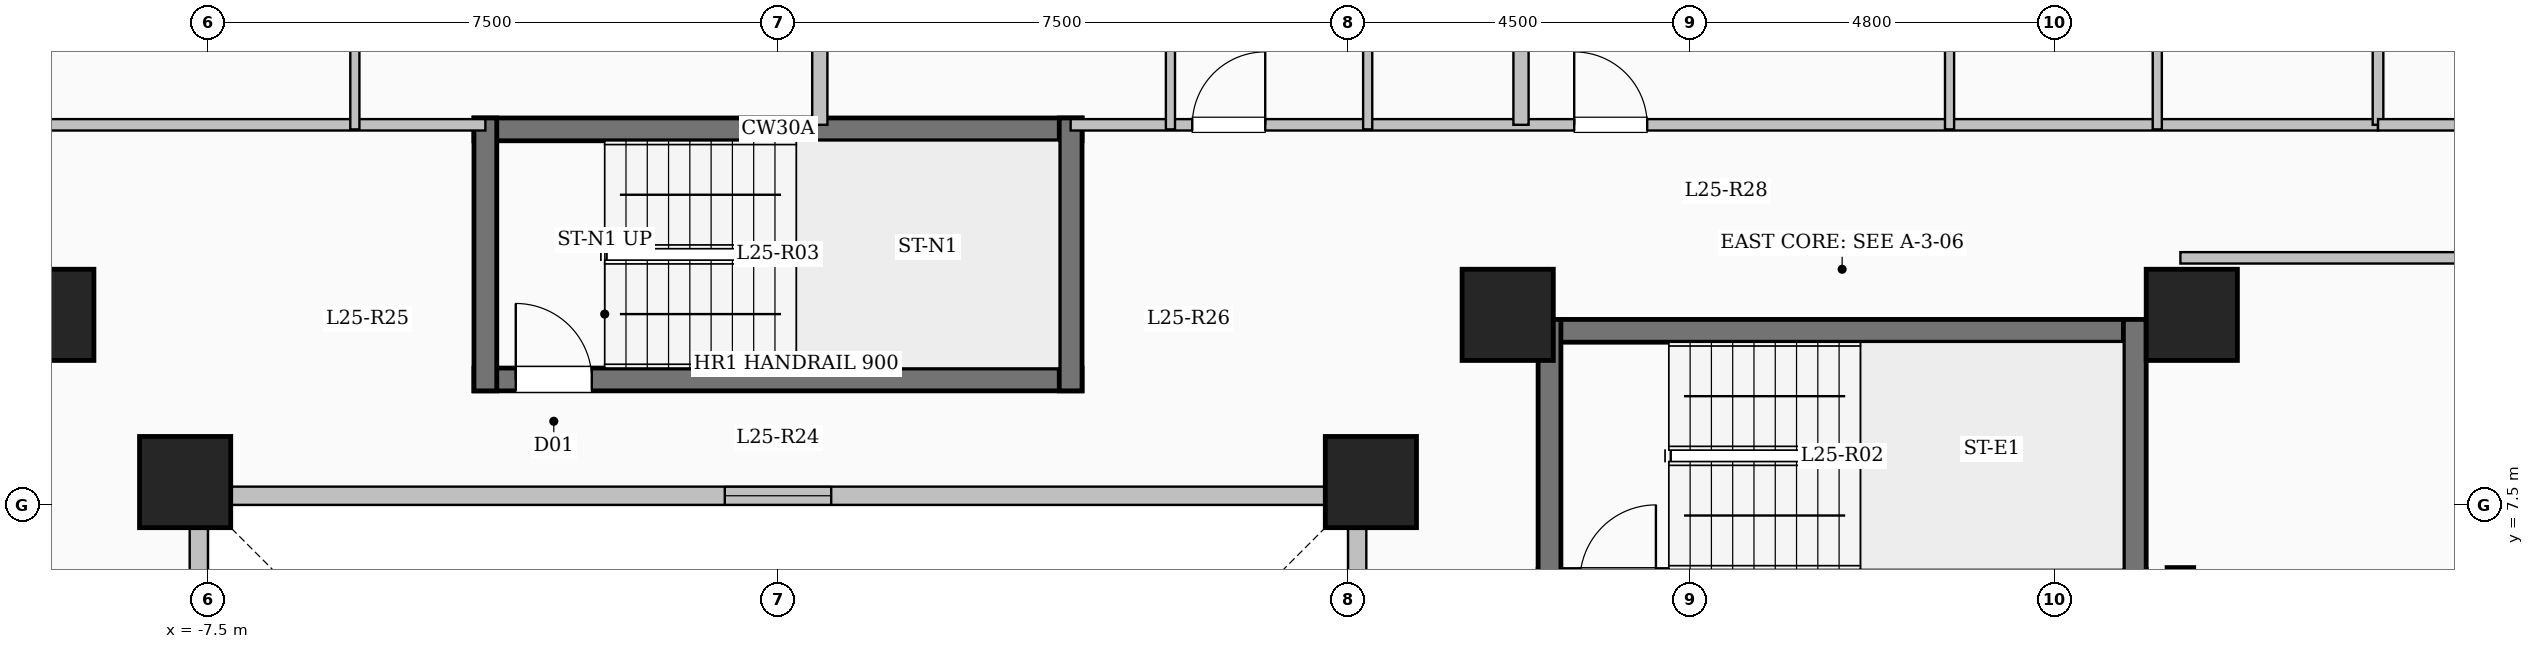
"""IFC4 building model, lengths in metres.
Left out: names, types, materials, properties, quantities, classifications, styles, units other than length and angle.
Written with IfcOpenShell. Run it as: python <this file> out.ifc"""

import sys

from ifc_helpers import new_model, si_unit, direction, frame, frame_2d, origin, origin_2d, place, context, subcontext, project, spatial, rectangle, extrude, element, fill, save


model = new_model("IFC4")
c1 = context("Model", 3, precision=1e-05, world=origin(), true_north=direction((0.0, 1.0)))
c2 = subcontext(c1, "Body", "Model", "MODEL_VIEW")
j1 = project(units=[si_unit("LENGTHUNIT", "METRE"), si_unit("PLANEANGLEUNIT", "RADIAN")], contexts=[c1])
p1 = place(None, origin())
s1 = spatial("IfcSite", under=j1, at=p1, CompositionType="ELEMENT")
p2 = place(p1, origin())
s2 = spatial("IfcBuilding", under=s1, at=p2, CompositionType="ELEMENT")
p3 = place(p2, frame((0.0, 0.0, 95.05)))
s3 = spatial("IfcBuildingStorey", under=s2, at=p3, CompositionType="ELEMENT", Elevation=95.05)
for number, where, z_axis, x_axis in (
    (1, (-7.8, 7.8, 0.0), (0.0, 0.0, 1.0), (1.0, 0.0, 0.0)),
    (2, (7.8, 7.8, 0.0), (0.0, 0.0, 1.0), (1.0, 0.0, 0.0)),
    (3, (-9.6, 10.0, 0.0), (0.0, 0.0, 1.0), (1.0, 0.0, 0.0)),
    (4, (9.6, 10.0, 0.0), (0.0, 0.0, 1.0), (1.0, 0.0, 0.0)),
    (5, (18.6, 10.0, 0.0), (0.0, 0.0, 1.0), (1.0, 0.0, 0.0)),
):
    element("IfcColumn", number, at=place(p3, frame(where, z_axis=z_axis, x_axis=x_axis)), inside=s3, PredefinedType="COLUMN", context=c2, shape_type="SweptSolid", body=[
        extrude(rectangle(XDim=1.2, YDim=1.2, at=origin_2d()), origin(), (0.0, 0.0, 1.0), 3.35),
    ])
p4 = place(p3, frame((7.62, -7.62, 0.0), z_axis=(0.0, 0.0, 1.0), x_axis=(0.0, 1.0, 0.0)))
e6 = element("IfcWall", 6, at=p4, inside=s3, PredefinedType="SOLIDWALL", context=c2, shape_type="SweptSolid", body=[
    extrude(rectangle(XDim=15.24, YDim=0.24, at=frame_2d((7.62, 0.0))), origin(), (0.0, 0.0, 1.0), 3.1),
])
p5 = place(p4, frame((6.92, 0.0, 0.95)))
e7 = element("IfcOpeningElement", 7, at=p5, cuts=e6, PredefinedType="OPENING", context=c2, shape_type="SweptSolid", body=[
    extrude(rectangle(XDim=1.4, YDim=1.5, at=frame_2d((0.7, 0.75))), frame((0.0, 0.13, 0.0), z_axis=(0.0, -1.0, 0.0), x_axis=(1.0, 0.0, 0.0)), (0.0, 0.0, 1.0), 0.26),
])
p6 = place(p3, frame((7.62, 7.62, 0.0), z_axis=(0.0, 0.0, 1.0), x_axis=(-1.0, 0.0, 0.0)))
e8 = element("IfcWall", 8, at=p6, inside=s3, PredefinedType="SOLIDWALL", context=c2, shape_type="SweptSolid", body=[
    extrude(rectangle(XDim=15.24, YDim=0.24, at=frame_2d((7.62, 0.0))), origin(), (0.0, 0.0, 1.0), 3.1),
])
p7 = place(p6, frame((6.92, 0.0, 0.95)))
e9 = element("IfcOpeningElement", 9, at=p7, cuts=e8, PredefinedType="OPENING", context=c2, shape_type="SweptSolid", body=[
    extrude(rectangle(XDim=1.4, YDim=1.5, at=frame_2d((0.7, 0.75))), frame((0.0, 0.13, 0.0), z_axis=(0.0, -1.0, 0.0), x_axis=(1.0, 0.0, 0.0)), (0.0, 0.0, 1.0), 0.26),
])
p8 = place(p3, frame((-7.62, 7.62, 0.0), z_axis=(0.0, 0.0, 1.0), x_axis=(0.0, -1.0, 0.0)))
e10 = element("IfcWall", 10, at=p8, inside=s3, PredefinedType="SOLIDWALL", context=c2, shape_type="SweptSolid", body=[
    extrude(rectangle(XDim=15.24, YDim=0.24, at=frame_2d((7.62, 0.0))), origin(), (0.0, 0.0, 1.0), 3.1),
])
p9 = place(p8, frame((6.92, 0.0, 0.95)))
e11 = element("IfcOpeningElement", 11, at=p9, cuts=e10, PredefinedType="OPENING", context=c2, shape_type="SweptSolid", body=[
    extrude(rectangle(XDim=1.4, YDim=1.5, at=frame_2d((0.7, 0.75))), frame((0.0, 0.13, 0.0), z_axis=(0.0, -1.0, 0.0), x_axis=(1.0, 0.0, 0.0)), (0.0, 0.0, 1.0), 0.26),
])
p10 = place(p3, frame((10.0, 9.79, 0.0), z_axis=(0.0, 0.0, 1.0), x_axis=(1.0, 0.0, 0.0)))
e12 = element("IfcWall", 12, at=p10, inside=s3, PredefinedType="SHEAR", context=c2, shape_type="SweptSolid", body=[
    extrude(rectangle(XDim=8.0, YDim=0.3, at=frame_2d((4.0, 0.0))), origin(), (0.0, 0.0, 1.0), 3.35),
])
p11 = place(p3, frame((10.0, 6.5, 0.0), z_axis=(0.0, 0.0, 1.0), x_axis=(1.0, 0.0, 0.0)))
e13 = element("IfcWall", 13, at=p11, inside=s3, PredefinedType="SHEAR", context=c2, shape_type="SweptSolid", body=[
    extrude(rectangle(XDim=8.0, YDim=0.3, at=frame_2d((4.0, 0.0))), origin(), (0.0, 0.0, 1.0), 3.35),
])
p12 = place(p11, frame((0.55, 0.0, 0.0)))
e14 = element("IfcOpeningElement", 14, at=p12, cuts=e13, PredefinedType="OPENING", context=c2, shape_type="SweptSolid", body=[
    extrude(rectangle(XDim=1.0, YDim=2.15, at=frame_2d((0.5, 1.075))), frame((0.0, 0.16, 0.0), z_axis=(0.0, -1.0, 0.0), x_axis=(1.0, 0.0, 0.0)), (0.0, 0.0, 1.0), 0.32),
])
for number, where, z_axis, x_axis in (
    (15, (10.15, 6.35, 0.0), (0.0, 0.0, 1.0), (0.0, 1.0, 0.0)),
    (16, (17.85, 6.35, 0.0), (0.0, 0.0, 1.0), (0.0, 1.0, 0.0)),
):
    element("IfcWall", number, at=place(p3, frame(where, z_axis=z_axis, x_axis=x_axis)), inside=s3, PredefinedType="SHEAR", context=c2, shape_type="SweptSolid", body=[
        extrude(rectangle(XDim=3.59, YDim=0.3, at=frame_2d((1.795, 0.0))), origin(), (0.0, 0.0, 1.0), 3.35),
    ])
p13 = place(p3, frame((-4.0, 12.44, 0.0), z_axis=(0.0, 0.0, 1.0), x_axis=(1.0, 0.0, 0.0)))
e17 = element("IfcWall", 17, at=p13, inside=s3, PredefinedType="SHEAR", context=c2, shape_type="SweptSolid", body=[
    extrude(rectangle(XDim=8.0, YDim=0.3, at=frame_2d((4.0, 0.0))), origin(), (0.0, 0.0, 1.0), 3.35),
])
p14 = place(p3, frame((-4.0, 9.15, 0.0), z_axis=(0.0, 0.0, 1.0), x_axis=(1.0, 0.0, 0.0)))
e18 = element("IfcWall", 18, at=p14, inside=s3, PredefinedType="SHEAR", context=c2, shape_type="SweptSolid", body=[
    extrude(rectangle(XDim=8.0, YDim=0.3, at=frame_2d((4.0, 0.0))), origin(), (0.0, 0.0, 1.0), 3.35),
])
p15 = place(p14, frame((0.55, 0.0, 0.0)))
e19 = element("IfcOpeningElement", 19, at=p15, cuts=e18, PredefinedType="OPENING", context=c2, shape_type="SweptSolid", body=[
    extrude(rectangle(XDim=1.0, YDim=2.15, at=frame_2d((0.5, 1.075))), frame((0.0, 0.16, 0.0), z_axis=(0.0, -1.0, 0.0), x_axis=(1.0, 0.0, 0.0)), (0.0, 0.0, 1.0), 0.32),
])
for number, where, z_axis, x_axis in (
    (20, (-3.85, 9.0, 0.0), (0.0, 0.0, 1.0), (0.0, 1.0, 0.0)),
    (21, (3.85, 9.0, 0.0), (0.0, 0.0, 1.0), (0.0, 1.0, 0.0)),
):
    element("IfcWall", number, at=place(p3, frame(where, z_axis=z_axis, x_axis=x_axis)), inside=s3, PredefinedType="SHEAR", context=c2, shape_type="SweptSolid", body=[
        extrude(rectangle(XDim=3.59, YDim=0.3, at=frame_2d((1.795, 0.0))), origin(), (0.0, 0.0, 1.0), 3.35),
    ])
p16 = place(p3, frame((18.45, -7.375, 0.0), z_axis=(0.0, 0.0, 1.0), x_axis=(0.0, 1.0, 0.0)))
e22 = element("IfcWall", 22, at=p16, inside=s3, PredefinedType="SHEAR", context=c2, shape_type="SweptSolid", body=[
    extrude(rectangle(XDim=14.05, YDim=0.35, at=frame_2d((7.025, 0.0))), origin(), (0.0, 0.0, 1.0), 3.35),
])
p17 = place(p3, frame((-21.05, 12.5, 0.0), z_axis=(0.0, 0.0, 1.0), x_axis=(1.0, 0.0, 0.0)))
e23 = element("IfcWall", 23, at=p17, inside=s3, PredefinedType="PARTITIONING", context=c2, shape_type="SweptSolid", body=[
    extrude(rectangle(XDim=17.2, YDim=0.15, at=frame_2d((8.6, 0.0))), origin(), (0.0, 0.0, 1.0), 3.1),
])
p18 = place(p17, frame((0.7, 0.0, 0.0)))
e24 = element("IfcOpeningElement", 24, at=p18, cuts=e23, PredefinedType="OPENING", context=c2, shape_type="SweptSolid", body=[
    extrude(rectangle(XDim=0.96, YDim=2.15, at=frame_2d((0.48, 1.075))), frame((0.0, 0.085, 0.0), z_axis=(0.0, -1.0, 0.0), x_axis=(1.0, 0.0, 0.0)), (0.0, 0.0, 1.0), 0.17),
])
p19 = place(p3, frame((3.85, 12.5, 0.0), z_axis=(0.0, 0.0, 1.0), x_axis=(1.0, 0.0, 0.0)))
e25 = element("IfcWall", 25, at=p19, inside=s3, PredefinedType="PARTITIONING", context=c2, shape_type="SweptSolid", body=[
    extrude(rectangle(XDim=17.2, YDim=0.15, at=frame_2d((8.6, 0.0))), origin(), (0.0, 0.0, 1.0), 3.1),
])
p20 = place(p19, frame((1.6, 0.0, 0.0)))
e26 = element("IfcOpeningElement", 26, at=p20, cuts=e25, PredefinedType="OPENING", context=c2, shape_type="SweptSolid", body=[
    extrude(rectangle(XDim=0.96, YDim=2.15, at=frame_2d((0.48, 1.075))), frame((0.0, 0.085, 0.0), z_axis=(0.0, -1.0, 0.0), x_axis=(1.0, 0.0, 0.0)), (0.0, 0.0, 1.0), 0.17),
])
p21 = place(p19, frame((6.625, 0.0, 0.0)))
e27 = element("IfcOpeningElement", 27, at=p21, cuts=e25, PredefinedType="OPENING", context=c2, shape_type="SweptSolid", body=[
    extrude(rectangle(XDim=0.96, YDim=2.15, at=frame_2d((0.48, 1.075))), frame((0.0, 0.085, 0.0), z_axis=(0.0, -1.0, 0.0), x_axis=(1.0, 0.0, 0.0)), (0.0, 0.0, 1.0), 0.17),
])
p22 = place(p3, frame((0.55, 12.5, 0.0), z_axis=(0.0, 0.0, 1.0), x_axis=(0.0, 1.0, 0.0)))
e28 = element("IfcWall", 28, at=p22, inside=s3, PredefinedType="SOLIDWALL", context=c2, shape_type="SweptSolid", body=[
    extrude(rectangle(XDim=11.08, YDim=0.2, at=frame_2d((5.54, 0.0))), origin(), (0.0, 0.0, 1.0), 3.1),
])
p23 = place(p3, frame((-5.567, 12.44, 0.0), z_axis=(0.0, 0.0, 1.0), x_axis=(0.0, 1.0, 0.0)))
e29 = element("IfcWall", 29, at=p23, inside=s3, PredefinedType="PARTITIONING", context=c2, shape_type="SweptSolid", body=[
    extrude(rectangle(XDim=2.62, YDim=0.12, at=frame_2d((1.31, 0.0))), origin(), (0.0, 0.0, 1.0), 3.1),
])
p24 = place(p3, frame((9.775, 12.5, 0.0), z_axis=(0.0, 0.0, 1.0), x_axis=(0.0, 1.0, 0.0)))
e30 = element("IfcWall", 30, at=p24, inside=s3, PredefinedType="SOLIDWALL", context=c2, shape_type="SweptSolid", body=[
    extrude(rectangle(XDim=9.902, YDim=0.2, at=frame_2d((4.951, 0.0))), origin(), (0.0, 0.0, 1.0), 3.1),
])
p25 = place(p3, frame((5.163, 12.44, 0.0), z_axis=(0.0, 0.0, 1.0), x_axis=(0.0, 1.0, 0.0)))
e31 = element("IfcWall", 31, at=p25, inside=s3, PredefinedType="PARTITIONING", context=c2, shape_type="SweptSolid", body=[
    extrude(rectangle(XDim=11.1, YDim=0.12, at=frame_2d((5.55, 0.0))), origin(), (0.0, 0.0, 1.0), 3.1),
])
p26 = place(p25, frame((3.075, 0.0, 0.0)))
e32 = element("IfcOpeningElement", 32, at=p26, cuts=e31, PredefinedType="OPENING", context=c2, shape_type="SweptSolid", body=[
    extrude(rectangle(XDim=1.08, YDim=2.15, at=frame_2d((0.54, 1.075))), frame((0.0, 0.07, 0.0), z_axis=(0.0, -1.0, 0.0), x_axis=(1.0, 0.0, 0.0)), (0.0, 0.0, 1.0), 0.14),
])
p27 = place(p3, frame((7.758, 12.44, 0.0), z_axis=(0.0, 0.0, 1.0), x_axis=(0.0, 1.0, 0.0)))
e33 = element("IfcWall", 33, at=p27, inside=s3, PredefinedType="PARTITIONING", context=c2, shape_type="SweptSolid", body=[
    extrude(rectangle(XDim=2.79, YDim=0.12, at=frame_2d((1.395, 0.0))), origin(), (0.0, 0.0, 1.0), 2.435),
])
p28 = place(p3, frame((15.413, 12.44, 0.0), z_axis=(0.0, 0.0, 1.0), x_axis=(0.0, 1.0, 0.0)))
e34 = element("IfcWall", 34, at=p28, inside=s3, PredefinedType="PARTITIONING", context=c2, shape_type="SweptSolid", body=[
    extrude(rectangle(XDim=9.66, YDim=0.12, at=frame_2d((4.83, 0.0))), origin(), (0.0, 0.0, 1.0), 3.1),
])
p29 = place(p28, frame((3.245, 0.0, 0.0)))
e35 = element("IfcOpeningElement", 35, at=p29, cuts=e34, PredefinedType="OPENING", context=c2, shape_type="SweptSolid", body=[
    extrude(rectangle(XDim=1.08, YDim=2.15, at=frame_2d((0.54, 1.075))), frame((0.0, 0.07, 0.0), z_axis=(0.0, -1.0, 0.0), x_axis=(1.0, 0.0, 0.0)), (0.0, 0.0, 1.0), 0.14),
])
p30 = place(p3, frame((18.146, 12.44, 0.0), z_axis=(0.0, 0.0, 1.0), x_axis=(0.0, 1.0, 0.0)))
e36 = element("IfcWall", 36, at=p30, inside=s3, PredefinedType="PARTITIONING", context=c2, shape_type="SweptSolid", body=[
    extrude(rectangle(XDim=2.96, YDim=0.12, at=frame_2d((1.48, 0.0))), origin(), (0.0, 0.0, 1.0), 3.1),
])
p31 = place(p3, frame((18.45, 10.75, 0.0), z_axis=(0.0, 0.0, 1.0), x_axis=(1.0, 0.0, 0.0)))
e37 = element("IfcWall", 37, at=p31, inside=s3, PredefinedType="PARTITIONING", context=c2, shape_type="SweptSolid", body=[
    extrude(rectangle(XDim=8.43, YDim=0.15, at=frame_2d((4.215, 0.0))), origin(), (0.0, 0.0, 1.0), 3.1),
])
p32 = place(p3, frame((21.05, 12.5, 0.0), z_axis=(0.0, 0.0, 1.0), x_axis=(0.0, 1.0, 0.0)))
e38 = element("IfcWall", 38, at=p32, inside=s3, PredefinedType="PARTITIONING", context=c2, shape_type="SweptSolid", body=[
    extrude(rectangle(XDim=5.35, YDim=0.14, at=frame_2d((2.675, 0.0))), origin(), (0.0, 0.0, 1.0), 3.1),
])
p33 = place(p3, frame((21.05, 12.5, 0.0), z_axis=(0.0, 0.0, 1.0), x_axis=(1.0, 0.0, 0.0)))
e39 = element("IfcWall", 39, at=p33, inside=s3, PredefinedType="PARTITIONING", context=c2, shape_type="SweptSolid", body=[
    extrude(rectangle(XDim=5.83, YDim=0.15, at=frame_2d((2.915, 0.0))), origin(), (0.0, 0.0, 1.0), 3.1),
])
p34 = place(p33, frame((2.44, 0.0, 0.0)))
e40 = element("IfcOpeningElement", 40, at=p34, cuts=e39, PredefinedType="OPENING", context=c2, shape_type="SweptSolid", body=[
    extrude(rectangle(XDim=0.95, YDim=2.15, at=frame_2d((0.475, 1.075))), frame((0.0, 0.085, 0.0), z_axis=(0.0, -1.0, 0.0), x_axis=(1.0, 0.0, 0.0)), (0.0, 0.0, 1.0), 0.17),
])
p35 = place(p7, origin())
e41 = element("IfcWindow", 41, at=p35, inside=s3, PartitioningType="SINGLE_PANEL", PredefinedType="WINDOW", context=c2, shape_type="SweptSolid", body=[
    extrude(rectangle(XDim=1.4, YDim=1.5, at=frame_2d((0.7, 0.75))), frame((0.0, 0.03, 0.0), z_axis=(0.0, -1.0, 0.0), x_axis=(1.0, 0.0, 0.0)), (0.0, 0.0, 1.0), 0.06),
])
fill(e9, e41)
p36 = place(p15, origin())
e42 = element("IfcDoor", 42, at=p36, inside=s3, OperationType="SINGLE_SWING_LEFT", PredefinedType="DOOR", context=c2, shape_type="SweptSolid", body=[
    extrude(rectangle(XDim=1.0, YDim=2.15, at=frame_2d((0.5, 1.075))), frame((0.0, 0.025, 0.0), z_axis=(0.0, -1.0, 0.0), x_axis=(1.0, 0.0, 0.0)), (0.0, 0.0, 1.0), 0.05),
])
fill(e19, e42)
p37 = place(p20, origin())
e43 = element("IfcDoor", 43, at=p37, inside=s3, OperationType="SINGLE_SWING_RIGHT", PredefinedType="DOOR", context=c2, shape_type="SweptSolid", body=[
    extrude(rectangle(XDim=0.96, YDim=2.15, at=frame_2d((0.48, 1.075))), frame((0.0, 0.025, 0.0), z_axis=(0.0, -1.0, 0.0), x_axis=(1.0, 0.0, 0.0)), (0.0, 0.0, 1.0), 0.05),
])
fill(e26, e43)
p38 = place(p21, origin())
e44 = element("IfcDoor", 44, at=p38, inside=s3, OperationType="SINGLE_SWING_LEFT", PredefinedType="DOOR", context=c2, shape_type="SweptSolid", body=[
    extrude(rectangle(XDim=0.96, YDim=2.15, at=frame_2d((0.48, 1.075))), frame((0.0, 0.025, 0.0), z_axis=(0.0, -1.0, 0.0), x_axis=(1.0, 0.0, 0.0)), (0.0, 0.0, 1.0), 0.05),
])
fill(e27, e44)
save(model, sys.argv[1])
